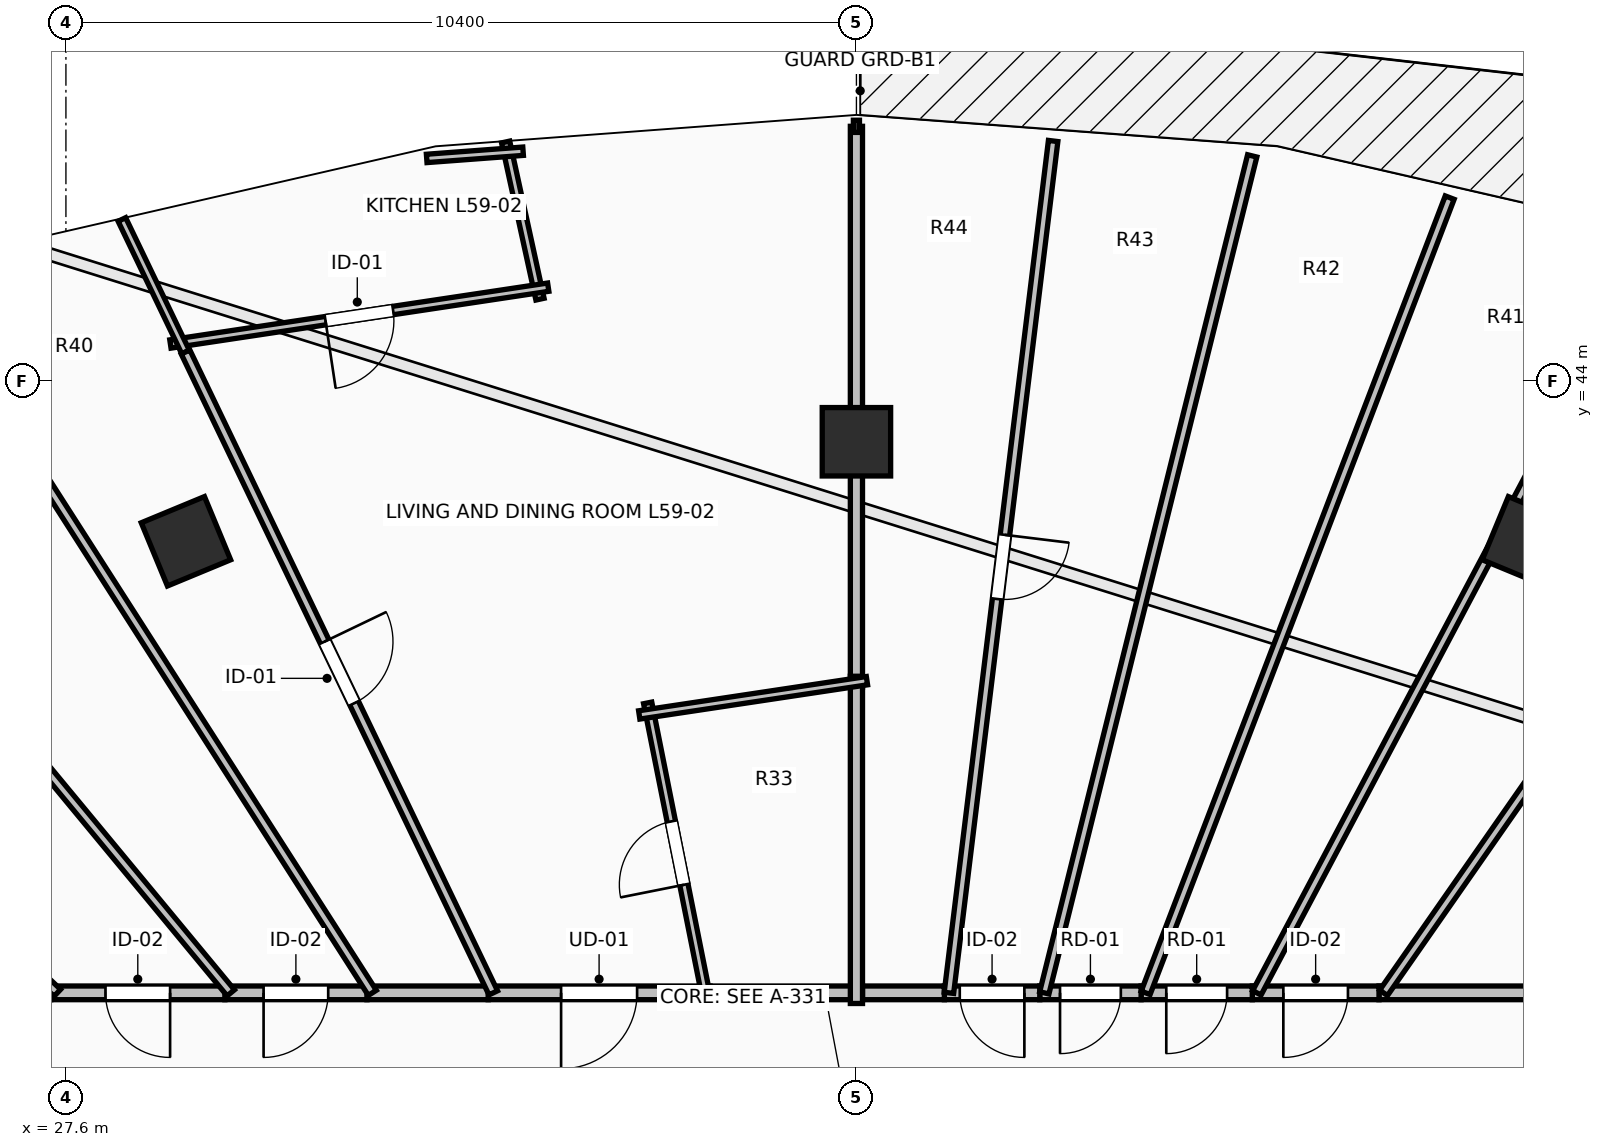
"""IFC4 building model, lengths in metres.
Left out: names, types, materials, properties, quantities, classifications, styles, units other than length and angle.
Written with IfcOpenShell. Run it as: python <this file> out.ifc"""

import sys

from ifc_helpers import new_model, si_unit, direction, frame, frame_2d, origin, origin_2d, place, context, subcontext, project, spatial, rectangle, extrude, element, fill, save


model = new_model("IFC4")
c1 = context("Model", 3, precision=1e-05, world=origin(), true_north=direction((0.0, 1.0)))
c2 = subcontext(c1, "Body", "Model", "MODEL_VIEW")
j1 = project(units=[si_unit("LENGTHUNIT", "METRE"), si_unit("PLANEANGLEUNIT", "RADIAN")], contexts=[c1])
p1 = place(None, origin())
s1 = spatial("IfcSite", under=j1, at=p1, CompositionType="ELEMENT")
p2 = place(p1, origin())
s2 = spatial("IfcBuilding", under=s1, at=p2, CompositionType="ELEMENT")
p3 = place(p2, frame((0.0, 0.0, 217.85)))
s3 = spatial("IfcBuildingStorey", under=s2, at=p3, CompositionType="ELEMENT", Elevation=217.85)
for number, where, z_axis, x_axis in (
    (1, (46.821, 41.891, 0.0), (0.0, 0.0, 1.0), (0.383, 0.924, 0.0)),
    (2, (38.0, 43.2, 0.0), (0.0, 0.0, 1.0), (0.0, 1.0, 0.0)),
    (3, (29.179, 41.891, 0.0), (0.0, 0.0, 1.0), (-0.383, 0.924, 0.0)),
):
    element("IfcColumn", number, at=place(p3, frame(where, z_axis=z_axis, x_axis=x_axis)), inside=s3, PredefinedType="COLUMN", context=c2, shape_type="SweptSolid", body=[
        extrude(rectangle(XDim=0.9, YDim=0.9, at=origin_2d()), origin(), (0.0, 0.0, 1.0), 3.55),
    ])
p4 = place(p3, frame((46.852, 35.95, 0.0), z_axis=(0.0, 0.0, 1.0), x_axis=(-1.0, 0.0, 0.0)))
e4 = element("IfcWall", 4, at=p4, inside=s3, PredefinedType="PARTITIONING", context=c2, shape_type="SweptSolid", body=[
    extrude(rectangle(XDim=1.977, YDim=0.18, at=frame_2d((0.989, 0.0))), origin(), (0.0, 0.0, 1.0), 3.29),
])
p5 = place(p3, frame((44.875, 35.95, 0.0), z_axis=(0.0, 0.0, 1.0), x_axis=(-1.0, 0.0, 0.0)))
e5 = element("IfcWall", 5, at=p5, inside=s3, PredefinedType="PARTITIONING", context=c2, shape_type="SweptSolid", body=[
    extrude(rectangle(XDim=1.667, YDim=0.18, at=frame_2d((0.833, 0.0))), origin(), (0.0, 0.0, 1.0), 3.29),
])
p6 = place(p5, frame((0.408, 0.0, 0.0)))
e6 = element("IfcOpeningElement", 6, at=p6, cuts=e5, PredefinedType="OPENING", context=c2, shape_type="SweptSolid", body=[
    extrude(rectangle(XDim=0.85, YDim=2.1, at=frame_2d((0.425, 1.05))), frame((0.0, 0.105, 0.0), z_axis=(0.0, -1.0, 0.0), x_axis=(1.0, 0.0, 0.0)), (0.0, 0.0, 1.0), 0.21),
])
p7 = place(p3, frame((43.208, 35.95, 0.0), z_axis=(0.0, 0.0, 1.0), x_axis=(-1.0, 0.0, 0.0)))
e7 = element("IfcWall", 7, at=p7, inside=s3, PredefinedType="PARTITIONING", context=c2, shape_type="SweptSolid", body=[
    extrude(rectangle(XDim=1.463, YDim=0.18, at=frame_2d((0.731, 0.0))), origin(), (0.0, 0.0, 1.0), 3.29),
])
p8 = place(p7, frame((0.332, 0.0, 0.0)))
e8 = element("IfcOpeningElement", 8, at=p8, cuts=e7, PredefinedType="OPENING", context=c2, shape_type="SweptSolid", body=[
    extrude(rectangle(XDim=0.8, YDim=2.05, at=frame_2d((0.4, 1.025))), frame((0.0, 0.105, 0.0), z_axis=(0.0, -1.0, 0.0), x_axis=(1.0, 0.0, 0.0)), (0.0, 0.0, 1.0), 0.21),
])
p9 = place(p3, frame((41.745, 35.95, 0.0), z_axis=(0.0, 0.0, 1.0), x_axis=(-1.0, 0.0, 0.0)))
e9 = element("IfcWall", 9, at=p9, inside=s3, PredefinedType="PARTITIONING", context=c2, shape_type="SweptSolid", body=[
    extrude(rectangle(XDim=1.333, YDim=0.18, at=frame_2d((0.667, 0.0))), origin(), (0.0, 0.0, 1.0), 3.29),
])
p10 = place(p9, frame((0.267, 0.0, 0.0)))
e10 = element("IfcOpeningElement", 10, at=p10, cuts=e9, PredefinedType="OPENING", context=c2, shape_type="SweptSolid", body=[
    extrude(rectangle(XDim=0.8, YDim=2.05, at=frame_2d((0.4, 1.025))), frame((0.0, 0.105, 0.0), z_axis=(0.0, -1.0, 0.0), x_axis=(1.0, 0.0, 0.0)), (0.0, 0.0, 1.0), 0.21),
])
p11 = place(p3, frame((40.412, 35.95, 0.0), z_axis=(0.0, 0.0, 1.0), x_axis=(-1.0, 0.0, 0.0)))
e11 = element("IfcWall", 11, at=p11, inside=s3, PredefinedType="PARTITIONING", context=c2, shape_type="SweptSolid", body=[
    extrude(rectangle(XDim=1.255, YDim=0.18, at=frame_2d((0.627, 0.0))), origin(), (0.0, 0.0, 1.0), 3.29),
])
p12 = place(p11, frame((0.202, 0.0, 0.0)))
e12 = element("IfcOpeningElement", 12, at=p12, cuts=e11, PredefinedType="OPENING", context=c2, shape_type="SweptSolid", body=[
    extrude(rectangle(XDim=0.85, YDim=2.1, at=frame_2d((0.425, 1.05))), frame((0.0, 0.105, 0.0), z_axis=(0.0, -1.0, 0.0), x_axis=(1.0, 0.0, 0.0)), (0.0, 0.0, 1.0), 0.21),
])
p13 = place(p3, frame((39.157, 35.95, 0.0), z_axis=(0.0, 0.0, 1.0), x_axis=(-1.0, 0.0, 0.0)))
e13 = element("IfcWall", 13, at=p13, inside=s3, PredefinedType="PARTITIONING", context=c2, shape_type="SweptSolid", body=[
    extrude(rectangle(XDim=1.217, YDim=0.18, at=frame_2d((0.608, 0.0))), origin(), (0.0, 0.0, 1.0), 3.29),
])
p14 = place(p3, frame((36.074, 35.95, 0.0), z_axis=(0.0, 0.0, 1.0), x_axis=(-1.0, 0.0, 0.0)))
e14 = element("IfcWall", 14, at=p14, inside=s3, PredefinedType="PARTITIONING", context=c2, shape_type="SweptSolid", body=[
    extrude(rectangle(XDim=2.919, YDim=0.18, at=frame_2d((1.459, 0.0))), origin(), (0.0, 0.0, 1.0), 3.29),
])
p15 = place(p14, frame((0.959, 0.0, 0.0)))
e15 = element("IfcOpeningElement", 15, at=p15, cuts=e14, PredefinedType="OPENING", context=c2, shape_type="SweptSolid", body=[
    extrude(rectangle(XDim=1.0, YDim=2.15, at=frame_2d((0.5, 1.075))), frame((0.0, 0.105, 0.0), z_axis=(0.0, -1.0, 0.0), x_axis=(1.0, 0.0, 0.0)), (0.0, 0.0, 1.0), 0.21),
])
p16 = place(p3, frame((38.08, 35.95, 0.0), z_axis=(0.0, 0.0, 1.0), x_axis=(-1.0, 0.0, 0.0)))
e16 = element("IfcWall", 16, at=p16, inside=s3, PredefinedType="PARTITIONING", context=c2, shape_type="SweptSolid", body=[
    extrude(rectangle(XDim=2.146, YDim=0.18, at=frame_2d((1.073, 0.0))), origin(), (0.0, 0.0, 1.0), 3.29),
])
p17 = place(p3, frame((33.155, 35.95, 0.0), z_axis=(0.0, 0.0, 1.0), x_axis=(-1.0, 0.0, 0.0)))
e17 = element("IfcWall", 17, at=p17, inside=s3, PredefinedType="PARTITIONING", context=c2, shape_type="SweptSolid", body=[
    extrude(rectangle(XDim=1.595, YDim=0.18, at=frame_2d((0.797, 0.0))), origin(), (0.0, 0.0, 1.0), 3.29),
])
p18 = place(p3, frame((31.56, 35.95, 0.0), z_axis=(0.0, 0.0, 1.0), x_axis=(-1.0, 0.0, 0.0)))
e18 = element("IfcWall", 18, at=p18, inside=s3, PredefinedType="PARTITIONING", context=c2, shape_type="SweptSolid", body=[
    extrude(rectangle(XDim=1.869, YDim=0.18, at=frame_2d((0.935, 0.0))), origin(), (0.0, 0.0, 1.0), 2.482),
])
p19 = place(p18, frame((0.51, 0.0, 0.0)))
e19 = element("IfcOpeningElement", 19, at=p19, cuts=e18, PredefinedType="OPENING", context=c2, shape_type="SweptSolid", body=[
    extrude(rectangle(XDim=0.85, YDim=2.1, at=frame_2d((0.425, 1.05))), frame((0.0, 0.105, 0.0), z_axis=(0.0, -1.0, 0.0), x_axis=(1.0, 0.0, 0.0)), (0.0, 0.0, 1.0), 0.21),
])
p20 = place(p3, frame((29.691, 35.95, 0.0), z_axis=(0.0, 0.0, 1.0), x_axis=(-1.0, 0.0, 0.0)))
e20 = element("IfcWall", 20, at=p20, inside=s3, PredefinedType="PARTITIONING", context=c2, shape_type="SweptSolid", body=[
    extrude(rectangle(XDim=2.291, YDim=0.18, at=frame_2d((1.146, 0.0))), origin(), (0.0, 0.0, 1.0), 2.482),
])
p21 = place(p20, frame((0.72, 0.0, 0.0)))
e21 = element("IfcOpeningElement", 21, at=p21, cuts=e20, PredefinedType="OPENING", context=c2, shape_type="SweptSolid", body=[
    extrude(rectangle(XDim=0.85, YDim=2.1, at=frame_2d((0.425, 1.05))), frame((0.0, 0.105, 0.0), z_axis=(0.0, -1.0, 0.0), x_axis=(1.0, 0.0, 0.0)), (0.0, 0.0, 1.0), 0.21),
])
p22 = place(p3, frame((51.099, 44.795, 0.0), z_axis=(0.0, 0.0, 1.0), x_axis=(-0.571754326018, -0.82042488424, 0.0)))
e22 = element("IfcWall", 22, at=p22, inside=s3, PredefinedType="PARTITIONING", context=c2, shape_type="SweptSolid", body=[
    extrude(rectangle(XDim=10.781, YDim=0.125, at=frame_2d((5.391, 0.0))), origin(), (0.0, 0.0, 1.0), 2.482),
])
p23 = place(p3, frame((48.482, 45.797, 0.0), z_axis=(0.0, 0.0, 1.0), x_axis=(-0.46793402924, -0.883763398359, 0.0)))
e23 = element("IfcWall", 23, at=p23, inside=s3, PredefinedType="PARTITIONING", context=c2, shape_type="SweptSolid", body=[
    extrude(rectangle(XDim=11.142, YDim=0.125, at=frame_2d((5.571, 0.0))), origin(), (0.0, 0.0, 1.0), 2.824),
])
p24 = place(p3, frame((45.805, 46.412, 0.0), z_axis=(0.0, 0.0, 1.0), x_axis=(-0.357119008819, -0.934058891901, 0.0)))
e24 = element("IfcWall", 24, at=p24, inside=s3, PredefinedType="PARTITIONING", context=c2, shape_type="SweptSolid", body=[
    extrude(rectangle(XDim=11.201, YDim=0.125, at=frame_2d((5.6, 0.0))), origin(), (0.0, 0.0, 1.0), 2.824),
])
p25 = place(p3, frame((43.207, 46.961, 0.0), z_axis=(0.0, 0.0, 1.0), x_axis=(-0.241072089133, -0.970507211638, 0.0)))
e25 = element("IfcWall", 25, at=p25, inside=s3, PredefinedType="PARTITIONING", context=c2, shape_type="SweptSolid", body=[
    extrude(rectangle(XDim=11.346, YDim=0.125, at=frame_2d((5.673, 0.0))), origin(), (0.0, 0.0, 1.0), 2.824),
])
p26 = place(p3, frame((40.588, 47.157, 0.0), z_axis=(0.0, 0.0, 1.0), x_axis=(-0.121415539359, -0.992601766471, 0.0)))
e26 = element("IfcWall", 26, at=p26, inside=s3, PredefinedType="PARTITIONING", context=c2, shape_type="SweptSolid", body=[
    extrude(rectangle(XDim=11.291, YDim=0.125, at=frame_2d((5.645, 0.0))), origin(), (0.0, 0.0, 1.0), 2.824),
])
p27 = place(p26, frame((5.22, 0.0, 0.0)))
e27 = element("IfcOpeningElement", 27, at=p27, cuts=e26, PredefinedType="OPENING", context=c2, shape_type="SweptSolid", body=[
    extrude(rectangle(XDim=0.85, YDim=2.1, at=frame_2d((0.425, 1.05))), frame((0.0, 0.077, 0.0), z_axis=(0.0, -1.0, 0.0), x_axis=(1.0, 0.0, 0.0)), (0.0, 0.0, 1.0), 0.155),
])
p28 = place(p3, frame((38.0, 47.35, 0.0), z_axis=(0.0, 0.0, 1.0), x_axis=(0.0, -1.0, 0.0)))
e28 = element("IfcWall", 28, at=p28, inside=s3, PredefinedType="PARTITIONING", context=c2, shape_type="SweptSolid", body=[
    extrude(rectangle(XDim=7.375, YDim=0.16, at=frame_2d((3.688, 0.0))), origin(), (0.0, 0.0, 1.0), 2.979),
])
p29 = place(p3, frame((38.0, 40.115, 0.0), z_axis=(0.0, 0.0, 1.0), x_axis=(0.0, -1.0, 0.0)))
e29 = element("IfcWall", 29, at=p29, inside=s3, PredefinedType="PARTITIONING", context=c2, shape_type="SweptSolid", body=[
    extrude(rectangle(XDim=4.305, YDim=0.16, at=frame_2d((2.152, 0.0))), origin(), (0.0, 0.0, 1.0), 2.924),
])
p30 = place(p3, frame((36.042, 35.813, 0.0), z_axis=(0.0, 0.0, 1.0), x_axis=(-0.195521857349, 0.980699343988, 0.0)))
e30 = element("IfcWall", 30, at=p30, inside=s3, PredefinedType="PARTITIONING", context=c2, shape_type="SweptSolid", body=[
    extrude(rectangle(XDim=4.03, YDim=0.11, at=frame_2d((2.015, 0.0))), origin(), (0.0, 0.0, 1.0), 2.924),
])
p31 = place(p30, frame((1.59, 0.0, 0.0)))
e31 = element("IfcOpeningElement", 31, at=p31, cuts=e30, PredefinedType="OPENING", context=c2, shape_type="SweptSolid", body=[
    extrude(rectangle(XDim=0.85, YDim=2.1, at=frame_2d((0.425, 1.05))), frame((0.0, 0.07, 0.0), z_axis=(0.0, -1.0, 0.0), x_axis=(1.0, 0.0, 0.0)), (0.0, 0.0, 1.0), 0.14),
])
p32 = place(p3, frame((35.143, 39.606, 0.0), z_axis=(0.0, 0.0, 1.0), x_axis=(0.988873015636, 0.148762088409, 0.0)))
e32 = element("IfcWall", 32, at=p32, inside=s3, PredefinedType="PARTITIONING", context=c2, shape_type="SweptSolid", body=[
    extrude(rectangle(XDim=3.03, YDim=0.11, at=frame_2d((1.515, 0.0))), origin(), (0.0, 0.0, 1.0), 2.979),
])
p33 = place(p3, frame((33.385, 47.144, 0.0), z_axis=(0.0, 0.0, 1.0), x_axis=(0.213521424511, -0.976938381514, 0.0)))
e33 = element("IfcWall", 33, at=p33, inside=s3, PredefinedType="PARTITIONING", context=c2, shape_type="SweptSolid", body=[
    extrude(rectangle(XDim=2.116, YDim=0.11, at=frame_2d((1.058, 0.0))), origin(), (0.0, 0.0, 1.0), 3.29),
])
p34 = place(p3, frame((33.945, 45.234, 0.0), z_axis=(0.0, 0.0, 1.0), x_axis=(-0.988872134662, -0.148767944424, 0.0)))
e34 = element("IfcWall", 34, at=p34, inside=s3, PredefinedType="PARTITIONING", context=c2, shape_type="SweptSolid", body=[
    extrude(rectangle(XDim=5.027, YDim=0.11, at=frame_2d((2.513, 0.0))), origin(), (0.0, 0.0, 1.0), 3.29),
])
p35 = place(p34, frame((2.063, 0.0, 0.0)))
e35 = element("IfcOpeningElement", 35, at=p35, cuts=e34, PredefinedType="OPENING", context=c2, shape_type="SweptSolid", body=[
    extrude(rectangle(XDim=0.9, YDim=2.1, at=frame_2d((0.45, 1.05))), frame((0.0, 0.07, 0.0), z_axis=(0.0, -1.0, 0.0), x_axis=(1.0, 0.0, 0.0)), (0.0, 0.0, 1.0), 0.14),
])
p36 = place(p3, frame((29.174, 44.381, 0.0), z_axis=(0.0, 0.0, 1.0), x_axis=(-0.432866492457, 0.901458041014, 0.0)))
e36 = element("IfcWall", 36, at=p36, inside=s3, PredefinedType="PARTITIONING", context=c2, shape_type="SweptSolid", body=[
    extrude(rectangle(XDim=1.934, YDim=0.11, at=frame_2d((0.967, 0.0))), origin(), (0.0, 0.0, 1.0), 3.29),
])
p37 = place(p3, frame((33.615, 47.022, 0.0), z_axis=(0.0, 0.0, 1.0), x_axis=(-0.997207179737, -0.074684942803, 0.0)))
e37 = element("IfcWall", 37, at=p37, inside=s3, PredefinedType="PARTITIONING", context=c2, shape_type="SweptSolid", body=[
    extrude(rectangle(XDim=1.272, YDim=0.11, at=frame_2d((0.636, 0.0))), origin(), (0.0, 0.0, 1.0), 3.29),
])
p38 = place(p3, frame((29.174, 44.381, 0.0), z_axis=(0.0, 0.0, 1.0), x_axis=(0.432861754343, -0.901460316169, 0.0)))
e38 = element("IfcWall", 38, at=p38, inside=s3, PredefinedType="PARTITIONING", context=c2, shape_type="SweptSolid", body=[
    extrude(rectangle(XDim=9.353, YDim=0.125, at=frame_2d((4.676, 0.0))), origin(), (0.0, 0.0, 1.0), 2.482),
])
p39 = place(p38, frame((4.226, 0.0, 0.0)))
e39 = element("IfcOpeningElement", 39, at=p39, cuts=e38, PredefinedType="OPENING", context=c2, shape_type="SweptSolid", body=[
    extrude(rectangle(XDim=0.9, YDim=2.1, at=frame_2d((0.45, 1.05))), frame((0.0, 0.077, 0.0), z_axis=(0.0, -1.0, 0.0), x_axis=(1.0, 0.0, 0.0)), (0.0, 0.0, 1.0), 0.155),
])
p40 = place(p3, frame((25.749, 45.138, 0.0), z_axis=(0.0, 0.0, 1.0), x_axis=(0.539168632786, -0.842197830335, 0.0)))
e40 = element("IfcWall", 40, at=p40, inside=s3, PredefinedType="PARTITIONING", context=c2, shape_type="SweptSolid", body=[
    extrude(rectangle(XDim=10.909, YDim=0.125, at=frame_2d((5.455, 0.0))), origin(), (0.0, 0.0, 1.0), 2.482),
])
p41 = place(p3, frame((23.066, 44.052, 0.0), z_axis=(0.0, 0.0, 1.0), x_axis=(0.637453668746, -0.770488689211, 0.0)))
e41 = element("IfcWall", 41, at=p41, inside=s3, PredefinedType="PARTITIONING", context=c2, shape_type="SweptSolid", body=[
    extrude(rectangle(XDim=10.515, YDim=0.125, at=frame_2d((5.258, 0.0))), origin(), (0.0, 0.0, 1.0), 2.482),
])
p42 = place(p3, frame((20.462, 42.599, 0.0), z_axis=(0.0, 0.0, 1.0), x_axis=(0.726274273347, -0.687405033349, 0.0)))
e42 = element("IfcWall", 42, at=p42, inside=s3, PredefinedType="PARTITIONING", context=c2, shape_type="SweptSolid", body=[
    extrude(rectangle(XDim=9.673, YDim=0.125, at=frame_2d((4.836, 0.0))), origin(), (0.0, 0.0, 1.0), 2.824),
])
p43 = place(p15, origin())
e43 = element("IfcDoor", 43, at=p43, inside=s3, OperationType="SINGLE_SWING_RIGHT", PredefinedType="DOOR", context=c2, shape_type="SweptSolid", body=[
    extrude(rectangle(XDim=1.0, YDim=2.15, at=frame_2d((0.5, 1.075))), frame((0.0, 0.025, 0.0), z_axis=(0.0, -1.0, 0.0), x_axis=(1.0, 0.0, 0.0)), (0.0, 0.0, 1.0), 0.05),
])
fill(e15, e43)
p44 = place(p31, origin())
e44 = element("IfcDoor", 44, at=p44, inside=s3, OperationType="SINGLE_SWING_LEFT", PredefinedType="DOOR", context=c2, shape_type="SweptSolid", body=[
    extrude(rectangle(XDim=0.85, YDim=2.1, at=frame_2d((0.425, 1.05))), frame((0.0, 0.025, 0.0), z_axis=(0.0, -1.0, 0.0), x_axis=(1.0, 0.0, 0.0)), (0.0, 0.0, 1.0), 0.05),
])
fill(e31, e44)
p45 = place(p35, origin())
e45 = element("IfcDoor", 45, at=p45, inside=s3, OperationType="SINGLE_SWING_RIGHT", PredefinedType="DOOR", context=c2, shape_type="SweptSolid", body=[
    extrude(rectangle(XDim=0.9, YDim=2.1, at=frame_2d((0.45, 1.05))), frame((0.0, 0.025, 0.0), z_axis=(0.0, -1.0, 0.0), x_axis=(1.0, 0.0, 0.0)), (0.0, 0.0, 1.0), 0.05),
])
fill(e35, e45)
p46 = place(p39, origin())
e46 = element("IfcDoor", 46, at=p46, inside=s3, OperationType="SINGLE_SWING_LEFT", PredefinedType="DOOR", context=c2, shape_type="SweptSolid", body=[
    extrude(rectangle(XDim=0.9, YDim=2.1, at=frame_2d((0.45, 1.05))), frame((0.0, 0.025, 0.0), z_axis=(0.0, -1.0, 0.0), x_axis=(1.0, 0.0, 0.0)), (0.0, 0.0, 1.0), 0.05),
])
fill(e39, e46)
p47 = place(p6, origin())
e47 = element("IfcDoor", 47, at=p47, inside=s3, OperationType="SINGLE_SWING_RIGHT", PredefinedType="DOOR", context=c2, shape_type="SweptSolid", body=[
    extrude(rectangle(XDim=0.85, YDim=2.1, at=frame_2d((0.425, 1.05))), frame((0.0, 0.025, 0.0), z_axis=(0.0, -1.0, 0.0), x_axis=(1.0, 0.0, 0.0)), (0.0, 0.0, 1.0), 0.05),
])
fill(e6, e47)
p48 = place(p8, origin())
e48 = element("IfcDoor", 48, at=p48, inside=s3, OperationType="SINGLE_SWING_RIGHT", PredefinedType="DOOR", context=c2, shape_type="SweptSolid", body=[
    extrude(rectangle(XDim=0.8, YDim=2.05, at=frame_2d((0.4, 1.025))), frame((0.0, 0.025, 0.0), z_axis=(0.0, -1.0, 0.0), x_axis=(1.0, 0.0, 0.0)), (0.0, 0.0, 1.0), 0.05),
])
fill(e8, e48)
p49 = place(p10, origin())
e49 = element("IfcDoor", 49, at=p49, inside=s3, OperationType="SINGLE_SWING_RIGHT", PredefinedType="DOOR", context=c2, shape_type="SweptSolid", body=[
    extrude(rectangle(XDim=0.8, YDim=2.05, at=frame_2d((0.4, 1.025))), frame((0.0, 0.025, 0.0), z_axis=(0.0, -1.0, 0.0), x_axis=(1.0, 0.0, 0.0)), (0.0, 0.0, 1.0), 0.05),
])
fill(e10, e49)
p50 = place(p12, origin())
e50 = element("IfcDoor", 50, at=p50, inside=s3, OperationType="SINGLE_SWING_LEFT", PredefinedType="DOOR", context=c2, shape_type="SweptSolid", body=[
    extrude(rectangle(XDim=0.85, YDim=2.1, at=frame_2d((0.425, 1.05))), frame((0.0, 0.025, 0.0), z_axis=(0.0, -1.0, 0.0), x_axis=(1.0, 0.0, 0.0)), (0.0, 0.0, 1.0), 0.05),
])
fill(e12, e50)
p51 = place(p19, origin())
e51 = element("IfcDoor", 51, at=p51, inside=s3, OperationType="SINGLE_SWING_RIGHT", PredefinedType="DOOR", context=c2, shape_type="SweptSolid", body=[
    extrude(rectangle(XDim=0.85, YDim=2.1, at=frame_2d((0.425, 1.05))), frame((0.0, 0.025, 0.0), z_axis=(0.0, -1.0, 0.0), x_axis=(1.0, 0.0, 0.0)), (0.0, 0.0, 1.0), 0.05),
])
fill(e19, e51)
p52 = place(p21, origin())
e52 = element("IfcDoor", 52, at=p52, inside=s3, OperationType="SINGLE_SWING_LEFT", PredefinedType="DOOR", context=c2, shape_type="SweptSolid", body=[
    extrude(rectangle(XDim=0.85, YDim=2.1, at=frame_2d((0.425, 1.05))), frame((0.0, 0.025, 0.0), z_axis=(0.0, -1.0, 0.0), x_axis=(1.0, 0.0, 0.0)), (0.0, 0.0, 1.0), 0.05),
])
fill(e21, e52)
p53 = place(p27, origin())
e53 = element("IfcDoor", 53, at=p53, inside=s3, OperationType="SINGLE_SWING_LEFT", PredefinedType="DOOR", context=c2, shape_type="SweptSolid", body=[
    extrude(rectangle(XDim=0.85, YDim=2.1, at=frame_2d((0.425, 1.05))), frame((0.0, 0.025, 0.0), z_axis=(0.0, -1.0, 0.0), x_axis=(1.0, 0.0, 0.0)), (0.0, 0.0, 1.0), 0.05),
])
fill(e27, e53)
save(model, sys.argv[1])
